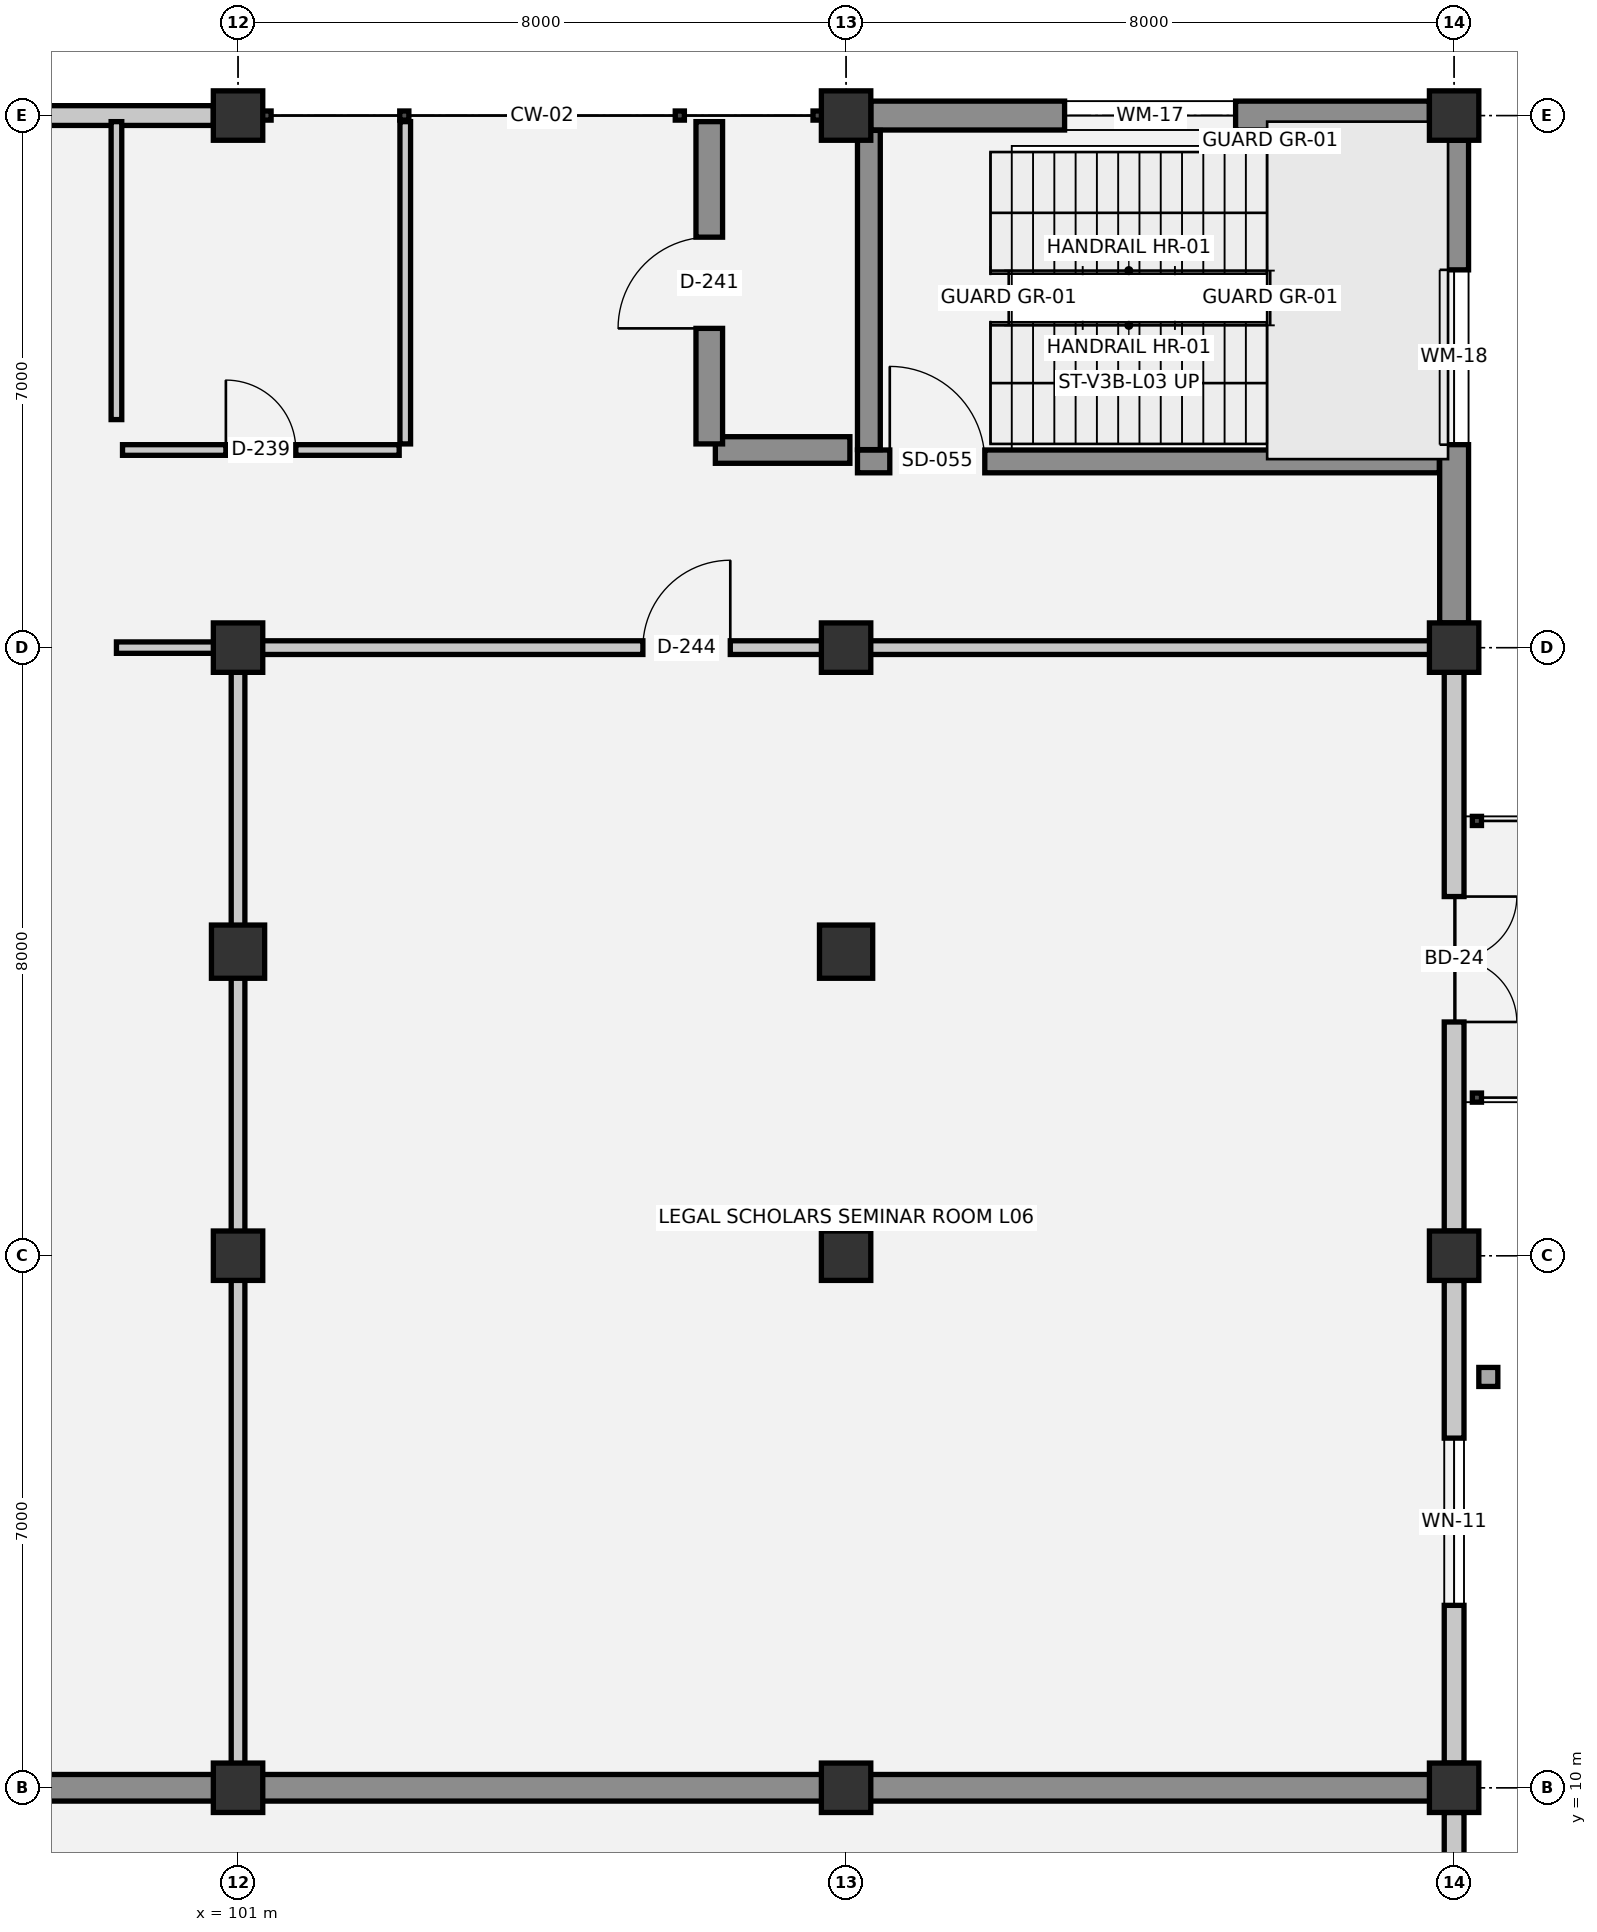
"""IFC4 building model, lengths in metres.
Left out: names, types, materials, properties, quantities, classifications, styles, units other than length and angle.
Written with IfcOpenShell. Run it as: python <this file> out.ifc"""

import sys

from ifc_helpers import new_model, si_unit, direction, frame, frame_2d, origin, origin_2d, place, context, subcontext, project, spatial, rectangle, circle, extrude, element, fill, save


model = new_model("IFC4")
c1 = context("Model", 3, precision=1e-05, world=origin(), true_north=direction((0.0, 1.0)))
c2 = subcontext(c1, "Body", "Model", "MODEL_VIEW")
j1 = project(units=[si_unit("LENGTHUNIT", "METRE"), si_unit("PLANEANGLEUNIT", "RADIAN")], contexts=[c1])
p1 = place(None, origin())
s1 = spatial("IfcSite", under=j1, at=p1, CompositionType="ELEMENT")
p2 = place(p1, origin())
s2 = spatial("IfcBuilding", under=s1, at=p2, CompositionType="ELEMENT")
p3 = place(p2, frame((0.0, 0.0, 9.9)))
s3 = spatial("IfcBuildingStorey", under=s2, at=p3, CompositionType="ELEMENT", Elevation=9.9)
for number, where, z_axis, x_axis in (
    (1, (101.0, 10.0, 0.0), (0.0, 0.0, 1.0), (1.0, 0.0, 0.0)),
    (2, (101.0, 17.0, 0.0), (0.0, 0.0, 1.0), (1.0, 0.0, 0.0)),
    (3, (101.0, 25.0, 0.0), (0.0, 0.0, 1.0), (1.0, 0.0, 0.0)),
    (4, (101.0, 32.0, 0.0), (0.0, 0.0, 1.0), (1.0, 0.0, 0.0)),
    (5, (109.0, 10.0, 0.0), (0.0, 0.0, 1.0), (1.0, 0.0, 0.0)),
    (6, (109.0, 17.0, 0.0), (0.0, 0.0, 1.0), (1.0, 0.0, 0.0)),
    (7, (109.0, 25.0, 0.0), (0.0, 0.0, 1.0), (1.0, 0.0, 0.0)),
    (8, (109.0, 32.0, 0.0), (0.0, 0.0, 1.0), (1.0, 0.0, 0.0)),
    (9, (117.0, 10.0, 0.0), (0.0, 0.0, 1.0), (1.0, 0.0, 0.0)),
    (10, (117.0, 17.0, 0.0), (0.0, 0.0, 1.0), (1.0, 0.0, 0.0)),
    (11, (117.0, 25.0, 0.0), (0.0, 0.0, 1.0), (1.0, 0.0, 0.0)),
    (12, (117.0, 32.0, 0.0), (0.0, 0.0, 1.0), (1.0, 0.0, 0.0)),
):
    element("IfcColumn", number, at=place(p3, frame(where, z_axis=z_axis, x_axis=x_axis)), inside=s3, PredefinedType="COLUMN", context=c2, shape_type="SweptSolid", body=[
        extrude(rectangle(XDim=0.65, YDim=0.65, at=origin_2d()), origin(), (0.0, 0.0, 1.0), 4.5),
    ])
for number, where, z_axis, x_axis in (
    (13, (101.0, 21.0, 0.0), (0.0, 0.0, 1.0), (1.0, 0.0, 0.0)),
    (14, (109.0, 21.0, 0.0), (0.0, 0.0, 1.0), (1.0, 0.0, 0.0)),
):
    element("IfcColumn", number, at=place(p3, frame(where, z_axis=z_axis, x_axis=x_axis)), inside=s3, PredefinedType="COLUMN", context=c2, shape_type="SweptSolid", body=[
        extrude(circle(Radius=0.35, at=origin_2d()), origin(), (0.0, 0.0, 1.0), 4.5),
    ])
p4 = place(p3, frame((93.325, 32.0, 0.0), z_axis=(0.0, 0.0, 1.0), x_axis=(1.0, 0.0, 0.0)))
e15 = element("IfcWall", 15, at=p4, inside=s3, PredefinedType="SOLIDWALL", context=c2, shape_type="SweptSolid", body=[
    extrude(rectangle(XDim=7.35, YDim=0.26, at=frame_2d((3.675, 0.0))), origin(), (0.0, 0.0, 1.0), 3.44),
])
p5 = place(p4, frame((1.475, 0.0, 0.0)))
e16 = element("IfcOpeningElement", 16, at=p5, cuts=e15, PredefinedType="OPENING", context=c2, shape_type="SweptSolid", body=[
    extrude(rectangle(XDim=1.8, YDim=2.25, at=frame_2d((0.9, 1.125))), frame((0.0, 0.14, 0.0), z_axis=(0.0, -1.0, 0.0), x_axis=(1.0, 0.0, 0.0)), (0.0, 0.0, 1.0), 0.28),
])
p6 = place(p3, frame((109.325, 32.0, 0.0), z_axis=(0.0, 0.0, 1.0), x_axis=(1.0, 0.0, 0.0)))
e17 = element("IfcWall", 17, at=p6, inside=s3, PredefinedType="STANDARD", context=c2, shape_type="SweptSolid", body=[
    extrude(rectangle(XDim=7.35, YDim=0.38, at=frame_2d((3.675, 0.0))), origin(), (0.0, 0.0, 1.0), 3.44),
])
p7 = place(p6, frame((2.55, 0.0, 0.95)))
e18 = element("IfcOpeningElement", 18, at=p7, cuts=e17, PredefinedType="OPENING", context=c2, shape_type="SweptSolid", body=[
    extrude(rectangle(XDim=2.25, YDim=1.9, at=frame_2d((1.125, 0.95))), frame((0.0, 0.2, 0.0), z_axis=(0.0, -1.0, 0.0), x_axis=(1.0, 0.0, 0.0)), (0.0, 0.0, 1.0), 0.4),
])
p8 = place(p3, frame((117.0, 31.675, 0.0), z_axis=(0.0, 0.0, 1.0), x_axis=(0.0, -1.0, 0.0)))
e19 = element("IfcWall", 19, at=p8, inside=s3, PredefinedType="STANDARD", context=c2, shape_type="SweptSolid", body=[
    extrude(rectangle(XDim=6.35, YDim=0.38, at=frame_2d((3.175, 0.0))), origin(), (0.0, 0.0, 1.0), 3.44),
])
p9 = place(p8, frame((1.705, 0.0, 0.95)))
e20 = element("IfcOpeningElement", 20, at=p9, cuts=e19, PredefinedType="OPENING", context=c2, shape_type="SweptSolid", body=[
    extrude(rectangle(XDim=2.3, YDim=1.95, at=frame_2d((1.15, 0.975))), frame((0.0, 0.2, 0.0), z_axis=(0.0, -1.0, 0.0), x_axis=(1.0, 0.0, 0.0)), (0.0, 0.0, 1.0), 0.4),
])
p10 = place(p3, frame((117.0, 24.675, 0.0), z_axis=(0.0, 0.0, 1.0), x_axis=(0.0, -1.0, 0.0)))
e21 = element("IfcWall", 21, at=p10, inside=s3, PredefinedType="SOLIDWALL", context=c2, shape_type="SweptSolid", body=[
    extrude(rectangle(XDim=7.35, YDim=0.26, at=frame_2d((3.675, 0.0))), origin(), (0.0, 0.0, 1.0), 3.44),
])
p11 = place(p10, frame((2.95, 0.0, 0.0)))
e22 = element("IfcOpeningElement", 22, at=p11, cuts=e21, PredefinedType="OPENING", context=c2, shape_type="SweptSolid", body=[
    extrude(rectangle(XDim=1.65, YDim=2.2, at=frame_2d((0.825, 1.1))), frame((0.0, 0.14, 0.0), z_axis=(0.0, -1.0, 0.0), x_axis=(1.0, 0.0, 0.0)), (0.0, 0.0, 1.0), 0.28),
])
p12 = place(p3, frame((117.0, 16.675, 0.0), z_axis=(0.0, 0.0, 1.0), x_axis=(0.0, -1.0, 0.0)))
e23 = element("IfcWall", 23, at=p12, inside=s3, PredefinedType="SOLIDWALL", context=c2, shape_type="SweptSolid", body=[
    extrude(rectangle(XDim=6.35, YDim=0.26, at=frame_2d((3.175, 0.0))), origin(), (0.0, 0.0, 1.0), 3.44),
])
p13 = place(p12, frame((2.075, 0.0, 0.9)))
e24 = element("IfcOpeningElement", 24, at=p13, cuts=e23, PredefinedType="OPENING", context=c2, shape_type="SweptSolid", body=[
    extrude(rectangle(XDim=2.2, YDim=1.9, at=frame_2d((1.1, 0.95))), frame((0.0, 0.14, 0.0), z_axis=(0.0, -1.0, 0.0), x_axis=(1.0, 0.0, 0.0)), (0.0, 0.0, 1.0), 0.28),
])
p14 = place(p3, frame((117.0, 9.675, 0.0), z_axis=(0.0, 0.0, 1.0), x_axis=(0.0, -1.0, 0.0)))
e25 = element("IfcWall", 25, at=p14, inside=s3, PredefinedType="SOLIDWALL", context=c2, shape_type="SweptSolid", body=[
    extrude(rectangle(XDim=5.35, YDim=0.26, at=frame_2d((2.675, 0.0))), origin(), (0.0, 0.0, 1.0), 3.44),
])
p15 = place(p14, frame((1.7, 0.0, 0.9)))
e26 = element("IfcOpeningElement", 26, at=p15, cuts=e25, PredefinedType="OPENING", context=c2, shape_type="SweptSolid", body=[
    extrude(rectangle(XDim=1.95, YDim=1.85, at=frame_2d((0.975, 0.925))), frame((0.0, 0.14, 0.0), z_axis=(0.0, -1.0, 0.0), x_axis=(1.0, 0.0, 0.0)), (0.0, 0.0, 1.0), 0.28),
])
p16 = place(p3, frame((109.15, 27.45, 0.0), z_axis=(0.0, 0.0, 1.0), x_axis=(1.0, 0.0, 0.0)))
e27 = element("IfcWall", 27, at=p16, inside=s3, PredefinedType="SHEAR", context=c2, shape_type="SweptSolid", body=[
    extrude(rectangle(XDim=7.655, YDim=0.3, at=frame_2d((3.828, 0.0))), origin(), (0.0, 0.0, 1.0), 4.16),
])
p17 = place(p16, frame((0.425, 0.0, 0.0)))
e28 = element("IfcOpeningElement", 28, at=p17, cuts=e27, PredefinedType="OPENING", context=c2, shape_type="SweptSolid", body=[
    extrude(rectangle(XDim=1.25, YDim=2.15, at=frame_2d((0.625, 1.075))), frame((0.0, 0.16, 0.0), z_axis=(0.0, -1.0, 0.0), x_axis=(1.0, 0.0, 0.0)), (0.0, 0.0, 1.0), 0.32),
])
p18 = place(p3, frame((109.3, 31.805, 0.0), z_axis=(0.0, 0.0, 1.0), x_axis=(0.0, -1.0, 0.0)))
e29 = element("IfcWall", 29, at=p18, inside=s3, PredefinedType="SHEAR", context=c2, shape_type="SweptSolid", body=[
    extrude(rectangle(XDim=4.2, YDim=0.3, at=frame_2d((2.1, 0.0))), origin(), (0.0, 0.0, 1.0), 4.16),
])
p19 = place(p3, frame((84.88, 10.0, 0.0), z_axis=(0.0, 0.0, 1.0), x_axis=(1.0, 0.0, 0.0)))
e30 = element("IfcWall", 30, at=p19, inside=s3, PredefinedType="SHEAR", context=c2, shape_type="SweptSolid", body=[
    extrude(rectangle(XDim=16.04, YDim=0.35, at=frame_2d((8.02, 0.0))), origin(), (0.0, 0.0, 1.0), 4.14),
])
p20 = place(p3, frame((101.08, 10.0, 0.0), z_axis=(0.0, 0.0, 1.0), x_axis=(1.0, 0.0, 0.0)))
e31 = element("IfcWall", 31, at=p20, inside=s3, PredefinedType="SHEAR", context=c2, shape_type="SweptSolid", body=[
    extrude(rectangle(XDim=15.84, YDim=0.35, at=frame_2d((7.92, 0.0))), origin(), (0.0, 0.0, 1.0), 4.14),
])
p21 = place(p3, frame((99.4, 25.0, 0.0), z_axis=(0.0, 0.0, 1.0), x_axis=(1.0, 0.0, 0.0)))
e32 = element("IfcWall", 32, at=p21, inside=s3, PredefinedType="PARTITIONING", context=c2, shape_type="SweptSolid", body=[
    extrude(rectangle(XDim=1.52, YDim=0.15, at=frame_2d((0.76, 0.0))), origin(), (0.0, 0.0, 1.0), 3.56),
])
p22 = place(p3, frame((101.08, 25.0, 0.0), z_axis=(0.0, 0.0, 1.0), x_axis=(1.0, 0.0, 0.0)))
e33 = element("IfcWall", 33, at=p22, inside=s3, PredefinedType="PARTITIONING", context=c2, shape_type="SweptSolid", body=[
    extrude(rectangle(XDim=15.84, YDim=0.18, at=frame_2d((7.92, 0.0))), origin(), (0.0, 0.0, 1.0), 3.56),
])
p23 = place(p22, frame((5.247, 0.0, 0.0)))
e34 = element("IfcOpeningElement", 34, at=p23, cuts=e33, PredefinedType="OPENING", context=c2, shape_type="SweptSolid", body=[
    extrude(rectangle(XDim=1.15, YDim=2.2, at=frame_2d((0.575, 1.1))), frame((0.0, 0.1, 0.0), z_axis=(0.0, -1.0, 0.0), x_axis=(1.0, 0.0, 0.0)), (0.0, 0.0, 1.0), 0.2),
])
p24 = place(p3, frame((99.48, 27.6, 0.0), z_axis=(0.0, 0.0, 1.0), x_axis=(1.0, 0.0, 0.0)))
e35 = element("IfcWall", 35, at=p24, inside=s3, PredefinedType="PLUMBINGWALL", context=c2, shape_type="SweptSolid", body=[
    extrude(rectangle(XDim=3.64, YDim=0.14, at=frame_2d((1.82, 0.0))), origin(), (0.0, 0.0, 1.0), 4.14),
])
p25 = place(p24, frame((1.36, 0.0, 0.0)))
e36 = element("IfcOpeningElement", 36, at=p25, cuts=e35, PredefinedType="OPENING", context=c2, shape_type="SweptSolid", body=[
    extrude(rectangle(XDim=0.92, YDim=2.1, at=frame_2d((0.46, 1.05))), frame((0.0, 0.08, 0.0), z_axis=(0.0, -1.0, 0.0), x_axis=(1.0, 0.0, 0.0)), (0.0, 0.0, 1.0), 0.16),
])
p26 = place(p3, frame((107.28, 27.6, 0.0), z_axis=(0.0, 0.0, 1.0), x_axis=(1.0, 0.0, 0.0)))
e37 = element("IfcWall", 37, at=p26, inside=s3, PredefinedType="SHEAR", context=c2, shape_type="SweptSolid", body=[
    extrude(rectangle(XDim=1.77, YDim=0.35, at=frame_2d((0.885, 0.0))), origin(), (0.0, 0.0, 1.0), 4.14),
])
p27 = place(p3, frame((99.4, 28.0, 0.0), z_axis=(0.0, 0.0, 1.0), x_axis=(0.0, 1.0, 0.0)))
e38 = element("IfcWall", 38, at=p27, inside=s3, PredefinedType="PLUMBINGWALL", context=c2, shape_type="SweptSolid", body=[
    extrude(rectangle(XDim=3.92, YDim=0.14, at=frame_2d((1.96, 0.0))), origin(), (0.0, 0.0, 1.0), 4.14),
])
p28 = place(p3, frame((101.0, 10.08, 0.0), z_axis=(0.0, 0.0, 1.0), x_axis=(0.0, 1.0, 0.0)))
e39 = element("IfcWall", 39, at=p28, inside=s3, PredefinedType="PARTITIONING", context=c2, shape_type="SweptSolid", body=[
    extrude(rectangle(XDim=14.84, YDim=0.18, at=frame_2d((7.42, 0.0))), origin(), (0.0, 0.0, 1.0), 3.61),
])
p29 = place(p3, frame((103.2, 27.68, 0.0), z_axis=(0.0, 0.0, 1.0), x_axis=(0.0, 1.0, 0.0)))
e40 = element("IfcWall", 40, at=p29, inside=s3, PredefinedType="PLUMBINGWALL", context=c2, shape_type="SweptSolid", body=[
    extrude(rectangle(XDim=4.24, YDim=0.14, at=frame_2d((2.12, 0.0))), origin(), (0.0, 0.0, 1.0), 4.14),
])
p30 = place(p3, frame((107.2, 27.68, 0.0), z_axis=(0.0, 0.0, 1.0), x_axis=(0.0, 1.0, 0.0)))
e41 = element("IfcWall", 41, at=p30, inside=s3, PredefinedType="SHEAR", context=c2, shape_type="SweptSolid", body=[
    extrude(rectangle(XDim=4.24, YDim=0.35, at=frame_2d((2.12, 0.0))), origin(), (0.0, 0.0, 1.0), 4.14),
])
p31 = place(p30, frame((1.52, 0.0, 0.0)))
e42 = element("IfcOpeningElement", 42, at=p31, cuts=e41, PredefinedType="OPENING", context=c2, shape_type="SweptSolid", body=[
    extrude(rectangle(XDim=1.2, YDim=2.15, at=frame_2d((0.6, 1.075))), frame((0.0, 0.185, 0.0), z_axis=(0.0, -1.0, 0.0), x_axis=(1.0, 0.0, 0.0)), (0.0, 0.0, 1.0), 0.37),
])
p32 = place(p11, origin())
e43 = element("IfcDoor", 43, at=p32, inside=s3, OperationType="DOUBLE_DOOR_SINGLE_SWING", PredefinedType="DOOR", context=c2, shape_type="SweptSolid", body=[
    extrude(rectangle(XDim=1.65, YDim=2.2, at=frame_2d((0.825, 1.1))), frame((0.0, 0.025, 0.0), z_axis=(0.0, -1.0, 0.0), x_axis=(1.0, 0.0, 0.0)), (0.0, 0.0, 1.0), 0.05),
])
fill(e22, e43)
p33 = place(p13, origin())
e44 = element("IfcWindow", 44, at=p33, inside=s3, PartitioningType="SINGLE_PANEL", PredefinedType="WINDOW", context=c2, shape_type="SweptSolid", body=[
    extrude(rectangle(XDim=2.2, YDim=1.9, at=frame_2d((1.1, 0.95))), frame((0.0, 0.03, 0.0), z_axis=(0.0, -1.0, 0.0), x_axis=(1.0, 0.0, 0.0)), (0.0, 0.0, 1.0), 0.06),
])
fill(e24, e44)
p34 = place(p17, origin())
e45 = element("IfcDoor", 45, at=p34, inside=s3, OperationType="SINGLE_SWING_LEFT", PredefinedType="DOOR", context=c2, shape_type="SweptSolid", body=[
    extrude(rectangle(XDim=1.25, YDim=2.15, at=frame_2d((0.625, 1.075))), frame((0.0, 0.025, 0.0), z_axis=(0.0, -1.0, 0.0), x_axis=(1.0, 0.0, 0.0)), (0.0, 0.0, 1.0), 0.05),
])
fill(e28, e45)
p35 = place(p25, origin())
e46 = element("IfcDoor", 46, at=p35, inside=s3, OperationType="SINGLE_SWING_LEFT", PredefinedType="DOOR", context=c2, shape_type="SweptSolid", body=[
    extrude(rectangle(XDim=0.92, YDim=2.1, at=frame_2d((0.46, 1.05))), frame((0.0, 0.025, 0.0), z_axis=(0.0, -1.0, 0.0), x_axis=(1.0, 0.0, 0.0)), (0.0, 0.0, 1.0), 0.05),
])
fill(e36, e46)
p36 = place(p31, origin())
e47 = element("IfcDoor", 47, at=p36, inside=s3, OperationType="SINGLE_SWING_LEFT", PredefinedType="DOOR", context=c2, shape_type="SweptSolid", body=[
    extrude(rectangle(XDim=1.2, YDim=2.15, at=frame_2d((0.6, 1.075))), frame((0.0, 0.025, 0.0), z_axis=(0.0, -1.0, 0.0), x_axis=(1.0, 0.0, 0.0)), (0.0, 0.0, 1.0), 0.05),
])
fill(e42, e47)
p37 = place(p23, origin())
e48 = element("IfcDoor", 48, at=p37, inside=s3, OperationType="SINGLE_SWING_RIGHT", PredefinedType="DOOR", context=c2, shape_type="SweptSolid", body=[
    extrude(rectangle(XDim=1.15, YDim=2.2, at=frame_2d((0.575, 1.1))), frame((0.0, 0.025, 0.0), z_axis=(0.0, -1.0, 0.0), x_axis=(1.0, 0.0, 0.0)), (0.0, 0.0, 1.0), 0.05),
])
fill(e34, e48)
p38 = place(p7, origin())
e49 = element("IfcWindow", 49, at=p38, inside=s3, PartitioningType="SINGLE_PANEL", PredefinedType="WINDOW", context=c2, shape_type="SweptSolid", body=[
    extrude(rectangle(XDim=2.25, YDim=1.9, at=frame_2d((1.125, 0.95))), frame((0.0, 0.03, 0.0), z_axis=(0.0, -1.0, 0.0), x_axis=(1.0, 0.0, 0.0)), (0.0, 0.0, 1.0), 0.06),
])
fill(e18, e49)
p39 = place(p9, origin())
e50 = element("IfcWindow", 50, at=p39, inside=s3, PartitioningType="SINGLE_PANEL", PredefinedType="WINDOW", context=c2, shape_type="SweptSolid", body=[
    extrude(rectangle(XDim=2.3, YDim=1.95, at=frame_2d((1.15, 0.975))), frame((0.0, 0.03, 0.0), z_axis=(0.0, -1.0, 0.0), x_axis=(1.0, 0.0, 0.0)), (0.0, 0.0, 1.0), 0.06),
])
fill(e20, e50)
save(model, sys.argv[1])
